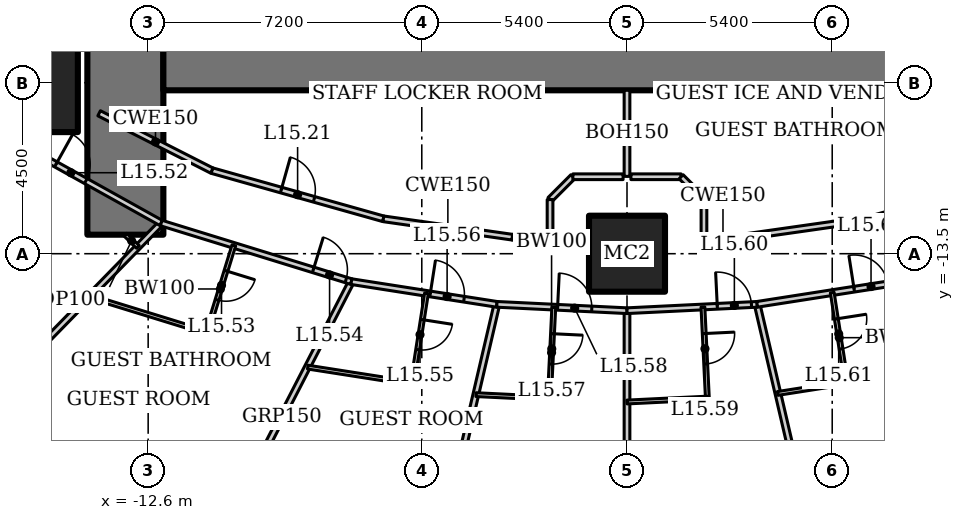
"""IFC4 building model, lengths in metres.
Left out: names, types, materials, properties, quantities, classifications, styles, units other than length and angle.
Written with IfcOpenShell. Run it as: python <this file> out.ifc"""

import sys

from ifc_helpers import new_model, si_unit, direction, frame, frame_2d, origin, origin_2d, place, context, subcontext, project, spatial, rectangle, hollow_rectangle, extrude, element, fill, save


model = new_model("IFC4")
c1 = context("Model", 3, precision=1e-05, world=origin(), true_north=direction((0.0, 1.0)))
c2 = subcontext(c1, "Body", "Model", "MODEL_VIEW")
j1 = project(units=[si_unit("LENGTHUNIT", "METRE"), si_unit("PLANEANGLEUNIT", "RADIAN")], contexts=[c1])
p1 = place(None, origin())
s1 = spatial("IfcSite", under=j1, at=p1, CompositionType="ELEMENT")
p2 = place(p1, origin())
s2 = spatial("IfcBuilding", under=s1, at=p2, CompositionType="ELEMENT")
p3 = place(p2, frame((0.0, 0.0, 69.4)))
s3 = spatial("IfcBuildingStorey", under=s2, at=p3, CompositionType="ELEMENT", Elevation=69.4)
p4 = place(p3, frame((-15.75, -9.0, 0.0), z_axis=(0.0, 0.0, 1.0), x_axis=(1.0, 0.0, 0.0)))
e1 = element("IfcColumn", 1, at=p4, inside=s3, PredefinedType="COLUMN", context=c2, shape_type="SweptSolid", body=[
    extrude(hollow_rectangle(XDim=2.6, YDim=2.6, WallThickness=0.13, at=origin_2d()), origin(), (0.0, 0.0, 1.0), 3.6),
])
p5 = place(p3, frame((0.0, -13.5, 0.0), z_axis=(0.0, 0.0, 1.0), x_axis=(1.0, 0.0, 0.0)))
e2 = element("IfcColumn", 2, at=p5, inside=s3, PredefinedType="COLUMN", context=c2, shape_type="SweptSolid", body=[
    extrude(hollow_rectangle(XDim=2.0, YDim=2.0, WallThickness=0.17, at=origin_2d()), origin(), (0.0, 0.0, 1.0), 3.6),
])
p6 = place(p3, frame((-13.2, 13.0, 0.0), z_axis=(0.0, 0.0, 1.0), x_axis=(0.0, -1.0, 0.0)))
e3 = element("IfcWall", 3, at=p6, inside=s3, PredefinedType="SHEAR", context=c2, shape_type="SweptSolid", body=[
    extrude(rectangle(XDim=26.0, YDim=2.0, at=frame_2d((13.0, 0.0))), origin(), (0.0, 0.0, 1.0), 3.6),
])
p7 = place(p6, frame((12.1, 0.0, 0.0)))
e4 = element("IfcOpeningElement", 4, at=p7, cuts=e3, PredefinedType="OPENING", context=c2, shape_type="SweptSolid", body=[
    extrude(rectangle(XDim=1.8, YDim=2.1, at=frame_2d((0.9, 1.05))), frame((0.0, 1.01, 0.0), z_axis=(0.0, -1.0, 0.0), x_axis=(1.0, 0.0, 0.0)), (0.0, 0.0, 1.0), 2.02),
])
p8 = place(p3, frame((-12.2, -8.0, 0.0), z_axis=(0.0, 0.0, 1.0), x_axis=(1.0, 0.0, 0.0)))
e5 = element("IfcWall", 5, at=p8, inside=s3, PredefinedType="SHEAR", context=c2, shape_type="SweptSolid", body=[
    extrude(rectangle(XDim=24.4, YDim=2.4, at=frame_2d((12.2, 0.0))), origin(), (0.0, 0.0, 1.0), 3.6),
])
p9 = place(p3, frame((-17.97, -18.542, 0.0), z_axis=(0.0, 0.0, 1.0), x_axis=(0.698757291878, 0.715358823981, 0.0)))
e6 = element("IfcWall", 6, at=p9, inside=s3, PredefinedType="PARTITIONING", context=c2, shape_type="SweptSolid", body=[
    extrude(rectangle(XDim=8.177, YDim=0.15, at=frame_2d((4.088, 0.0))), origin(), (0.0, 0.0, 1.0), 2.528),
])
p10 = place(p3, frame((-10.912, -21.346, 0.0), z_axis=(0.0, 0.0, 1.0), x_axis=(0.45752665959, 0.889195904042, 0.0)))
e7 = element("IfcWall", 7, at=p10, inside=s3, PredefinedType="PARTITIONING", context=c2, shape_type="SweptSolid", body=[
    extrude(rectangle(XDim=7.997, YDim=0.15, at=frame_2d((3.999, 0.0))), origin(), (0.0, 0.0, 1.0), 2.528),
])
p11 = place(p3, frame((-5.211, -22.496, 0.0), z_axis=(0.0, 0.0, 1.0), x_axis=(0.227056984461, 0.973881474209, 0.0)))
e8 = element("IfcWall", 8, at=p11, inside=s3, PredefinedType="PARTITIONING", context=c2, shape_type="SweptSolid", body=[
    extrude(rectangle(XDim=7.869, YDim=0.15, at=frame_2d((3.934, 0.0))), origin(), (0.0, 0.0, 1.0), 2.767),
])
p12 = place(p3, frame((0.0, -22.825, 0.0), z_axis=(0.0, 0.0, 1.0), x_axis=(0.0, 1.0, 0.0)))
e9 = element("IfcWall", 9, at=p12, inside=s3, PredefinedType="PARTITIONING", context=c2, shape_type="SweptSolid", body=[
    extrude(rectangle(XDim=7.825, YDim=0.15, at=frame_2d((3.912, 0.0))), origin(), (0.0, 0.0, 1.0), 2.924),
])
p13 = place(p3, frame((5.211, -22.496, 0.0), z_axis=(0.0, 0.0, 1.0), x_axis=(-0.227056984461, 0.973881474209, 0.0)))
e10 = element("IfcWall", 10, at=p13, inside=s3, PredefinedType="PARTITIONING", context=c2, shape_type="SweptSolid", body=[
    extrude(rectangle(XDim=7.869, YDim=0.15, at=frame_2d((3.934, 0.0))), origin(), (0.0, 0.0, 1.0), 2.767),
])
p14 = place(p3, frame((-17.299, -9.885, 0.0), z_axis=(0.0, 0.0, 1.0), x_axis=(0.873695910579, -0.486472461541, 0.0)))
e11 = element("IfcWall", 11, at=p14, inside=s3, PredefinedType="PARTITIONING", context=c2, shape_type="SweptSolid", body=[
    extrude(rectangle(XDim=5.771, YDim=0.15, at=frame_2d((2.885, 0.0))), origin(), (0.0, 0.0, 1.0), 3.45),
])
p15 = place(p14, frame((2.6, 0.0, 0.0)))
e12 = element("IfcOpeningElement", 12, at=p15, cuts=e11, PredefinedType="OPENING", context=c2, shape_type="SweptSolid", body=[
    extrude(rectangle(XDim=0.9, YDim=2.1, at=frame_2d((0.45, 1.05))), frame((0.0, 0.085, 0.0), z_axis=(0.0, -1.0, 0.0), x_axis=(1.0, 0.0, 0.0)), (0.0, 0.0, 1.0), 0.17),
])
p16 = place(p3, frame((-12.257, -12.693, 0.0), z_axis=(0.0, 0.0, 1.0), x_axis=(0.955657956744, -0.294478980085, 0.0)))
e13 = element("IfcWall", 13, at=p16, inside=s3, PredefinedType="PARTITIONING", context=c2, shape_type="SweptSolid", body=[
    extrude(rectangle(XDim=5.236, YDim=0.15, at=frame_2d((2.618, 0.0))), origin(), (0.0, 0.0, 1.0), 3.45),
])
p17 = place(p16, frame((4.186, 0.0, 0.0)))
e14 = element("IfcOpeningElement", 14, at=p17, cuts=e13, PredefinedType="OPENING", context=c2, shape_type="SweptSolid", body=[
    extrude(rectangle(XDim=0.9, YDim=2.1, at=frame_2d((0.45, 1.05))), frame((0.0, 0.085, 0.0), z_axis=(0.0, -1.0, 0.0), x_axis=(1.0, 0.0, 0.0)), (0.0, 0.0, 1.0), 0.17),
])
p18 = place(p3, frame((-7.253, -14.235, 0.0), z_axis=(0.0, 0.0, 1.0), x_axis=(0.988015036573, -0.154357660987, 0.0)))
e15 = element("IfcWall", 15, at=p18, inside=s3, PredefinedType="PARTITIONING", context=c2, shape_type="SweptSolid", body=[
    extrude(rectangle(XDim=3.875, YDim=0.15, at=frame_2d((1.938, 0.0))), origin(), (0.0, 0.0, 1.0), 3.45),
])
p19 = place(p18, frame((2.1, 0.0, 0.0)))
e16 = element("IfcOpeningElement", 16, at=p19, cuts=e15, PredefinedType="OPENING", context=c2, shape_type="SweptSolid", body=[
    extrude(rectangle(XDim=0.9, YDim=2.1, at=frame_2d((0.45, 1.05))), frame((0.0, 0.085, 0.0), z_axis=(0.0, -1.0, 0.0), x_axis=(1.0, 0.0, 0.0)), (0.0, 0.0, 1.0), 0.17),
])
p20 = place(p3, frame((-3.424, -14.833, 0.0), z_axis=(0.0, 0.0, 1.0), x_axis=(0.998809560203, -0.048779733975, 0.0)))
e17 = element("IfcWall", 17, at=p20, inside=s3, PredefinedType="PARTITIONING", context=c2, shape_type="SweptSolid", body=[
    extrude(rectangle(XDim=3.428, YDim=0.15, at=frame_2d((1.714, 0.0))), origin(), (0.0, 0.0, 1.0), 3.45),
])
p21 = place(p20, frame((1.6, 0.0, 0.0)))
e18 = element("IfcOpeningElement", 18, at=p21, cuts=e17, PredefinedType="OPENING", context=c2, shape_type="SweptSolid", body=[
    extrude(rectangle(XDim=0.9, YDim=2.1, at=frame_2d((0.45, 1.05))), frame((0.0, 0.085, 0.0), z_axis=(0.0, -1.0, 0.0), x_axis=(1.0, 0.0, 0.0)), (0.0, 0.0, 1.0), 0.17),
])
p22 = place(p3, frame((0.0, -15.0, 0.0), z_axis=(0.0, 0.0, 1.0), x_axis=(0.998809560203, 0.048779733975, 0.0)))
e19 = element("IfcWall", 19, at=p22, inside=s3, PredefinedType="PARTITIONING", context=c2, shape_type="SweptSolid", body=[
    extrude(rectangle(XDim=3.428, YDim=0.15, at=frame_2d((1.714, 0.0))), origin(), (0.0, 0.0, 1.0), 3.45),
])
p23 = place(p22, frame((2.378, 0.0, 0.0)))
e20 = element("IfcOpeningElement", 20, at=p23, cuts=e19, PredefinedType="OPENING", context=c2, shape_type="SweptSolid", body=[
    extrude(rectangle(XDim=0.9, YDim=2.1, at=frame_2d((0.45, 1.05))), frame((0.0, 0.085, 0.0), z_axis=(0.0, -1.0, 0.0), x_axis=(1.0, 0.0, 0.0)), (0.0, 0.0, 1.0), 0.17),
])
p24 = place(p3, frame((3.424, -14.833, 0.0), z_axis=(0.0, 0.0, 1.0), x_axis=(0.988015036573, 0.154357660987, 0.0)))
e21 = element("IfcWall", 21, at=p24, inside=s3, PredefinedType="PARTITIONING", context=c2, shape_type="SweptSolid", body=[
    extrude(rectangle(XDim=3.875, YDim=0.15, at=frame_2d((1.938, 0.0))), origin(), (0.0, 0.0, 1.0), 3.45),
])
p25 = place(p24, frame((2.583, 0.0, 0.0)))
e22 = element("IfcOpeningElement", 22, at=p25, cuts=e21, PredefinedType="OPENING", context=c2, shape_type="SweptSolid", body=[
    extrude(rectangle(XDim=0.9, YDim=2.1, at=frame_2d((0.45, 1.05))), frame((0.0, 0.085, 0.0), z_axis=(0.0, -1.0, 0.0), x_axis=(1.0, 0.0, 0.0)), (0.0, 0.0, 1.0), 0.17),
])
p26 = place(p3, frame((-10.924, -11.312, 0.0), z_axis=(0.0, 0.0, 1.0), x_axis=(0.962643729928, -0.270771211967, 0.0)))
e23 = element("IfcWall", 23, at=p26, inside=s3, PredefinedType="PARTITIONING", context=c2, shape_type="SweptSolid", body=[
    extrude(rectangle(XDim=4.688, YDim=0.15, at=frame_2d((2.344, 0.0))), origin(), (0.0, 0.0, 1.0), 3.45),
])
p27 = place(p26, frame((1.894, 0.0, 0.0)))
e24 = element("IfcOpeningElement", 24, at=p27, cuts=e23, PredefinedType="OPENING", context=c2, shape_type="SweptSolid", body=[
    extrude(rectangle(XDim=0.9, YDim=2.1, at=frame_2d((0.45, 1.05))), frame((0.0, 0.085, 0.0), z_axis=(0.0, -1.0, 0.0), x_axis=(1.0, 0.0, 0.0)), (0.0, 0.0, 1.0), 0.17),
])
for number, where, z_axis, x_axis in (
    (25, (-6.411, -12.582, 0.0), (0.0, 0.0, 1.0), (0.99, -0.141, 0.0)),
    (26, (3.016, -13.066, 0.0), (0.0, 0.0, 1.0), (0.99, 0.141, 0.0)),
):
    element("IfcWall", number, at=place(p3, frame(where, z_axis=z_axis, x_axis=x_axis)), inside=s3, PredefinedType="PARTITIONING", context=c2, shape_type="SweptSolid", body=[
        extrude(rectangle(XDim=3.429, YDim=0.15, at=frame_2d((1.714, 0.0))), origin(), (0.0, 0.0, 1.0), 3.45),
    ])
p28 = place(p3, frame((6.411, -12.582, 0.0), z_axis=(0.0, 0.0, 1.0), x_axis=(0.962643729928, 0.270771211967, 0.0)))
e27 = element("IfcWall", 27, at=p28, inside=s3, PredefinedType="PARTITIONING", context=c2, shape_type="SweptSolid", body=[
    extrude(rectangle(XDim=4.688, YDim=0.15, at=frame_2d((2.344, 0.0))), origin(), (0.0, 0.0, 1.0), 3.45),
])
p29 = place(p28, frame((1.894, 0.0, 0.0)))
e28 = element("IfcOpeningElement", 28, at=p29, cuts=e27, PredefinedType="OPENING", context=c2, shape_type="SweptSolid", body=[
    extrude(rectangle(XDim=0.9, YDim=2.1, at=frame_2d((0.45, 1.05))), frame((0.0, 0.085, 0.0), z_axis=(0.0, -1.0, 0.0), x_axis=(1.0, 0.0, 0.0)), (0.0, 0.0, 1.0), 0.17),
])
p30 = place(p3, frame((-10.346, -13.281, 0.0), z_axis=(0.0, 0.0, 1.0), x_axis=(-0.294478957423, -0.955657963727, 0.0)))
e29 = element("IfcWall", 29, at=p30, inside=s3, PredefinedType="PARTITIONING", context=c2, shape_type="SweptSolid", body=[
    extrude(rectangle(XDim=2.4, YDim=0.1, at=frame_2d((1.2, 0.0))), origin(), (0.0, 0.0, 1.0), 3.45),
])
p31 = place(p30, frame((0.7, 0.0, 0.0)))
e30 = element("IfcOpeningElement", 30, at=p31, cuts=e29, PredefinedType="OPENING", context=c2, shape_type="SweptSolid", body=[
    extrude(rectangle(XDim=0.8, YDim=2.1, at=frame_2d((0.4, 1.05))), frame((0.0, 0.06, 0.0), z_axis=(0.0, -1.0, 0.0), x_axis=(1.0, 0.0, 0.0)), (0.0, 0.0, 1.0), 0.12),
])
p32 = place(p3, frame((-11.052, -15.575, 0.0), z_axis=(0.0, 0.0, 1.0), x_axis=(-0.955641033268, 0.294533895391, 0.0)))
e31 = element("IfcWall", 31, at=p32, inside=s3, PredefinedType="PARTITIONING", context=c2, shape_type="SweptSolid", body=[
    extrude(rectangle(XDim=3.216, YDim=0.1, at=frame_2d((1.608, 0.0))), origin(), (0.0, 0.0, 1.0), 3.45),
])
p33 = place(p3, frame((-5.277, -14.543, 0.0), z_axis=(0.0, 0.0, 1.0), x_axis=(-0.154426532979, -0.988004274238, 0.0)))
e32 = element("IfcWall", 32, at=p33, inside=s3, PredefinedType="PARTITIONING", context=c2, shape_type="SweptSolid", body=[
    extrude(rectangle(XDim=2.4, YDim=0.1, at=frame_2d((1.2, 0.0))), origin(), (0.0, 0.0, 1.0), 3.45),
])
p34 = place(p33, frame((0.7, 0.0, 0.0)))
e33 = element("IfcOpeningElement", 33, at=p34, cuts=e32, PredefinedType="OPENING", context=c2, shape_type="SweptSolid", body=[
    extrude(rectangle(XDim=0.8, YDim=2.1, at=frame_2d((0.4, 1.05))), frame((0.0, 0.06, 0.0), z_axis=(0.0, -1.0, 0.0), x_axis=(1.0, 0.0, 0.0)), (0.0, 0.0, 1.0), 0.12),
])
p35 = place(p3, frame((-5.647, -16.915, 0.0), z_axis=(0.0, 0.0, 1.0), x_axis=(-0.988015375833, 0.154355489429, 0.0)))
e34 = element("IfcWall", 34, at=p35, inside=s3, PredefinedType="PARTITIONING", context=c2, shape_type="SweptSolid", body=[
    extrude(rectangle(XDim=2.785, YDim=0.1, at=frame_2d((1.393, 0.0))), origin(), (0.0, 0.0, 1.0), 3.45),
])
p36 = place(p3, frame((-1.926, -14.906, 0.0), z_axis=(0.0, 0.0, 1.0), x_axis=(-0.048725028858, -0.998812230383, 0.0)))
e35 = element("IfcWall", 35, at=p36, inside=s3, PredefinedType="PARTITIONING", context=c2, shape_type="SweptSolid", body=[
    extrude(rectangle(XDim=2.4, YDim=0.1, at=frame_2d((1.2, 0.0))), origin(), (0.0, 0.0, 1.0), 2.749),
])
p37 = place(p36, frame((0.7, 0.0, 0.0)))
e36 = element("IfcOpeningElement", 36, at=p37, cuts=e35, PredefinedType="OPENING", context=c2, shape_type="SweptSolid", body=[
    extrude(rectangle(XDim=0.8, YDim=2.1, at=frame_2d((0.4, 1.05))), frame((0.0, 0.06, 0.0), z_axis=(0.0, -1.0, 0.0), x_axis=(1.0, 0.0, 0.0)), (0.0, 0.0, 1.0), 0.12),
])
p38 = place(p3, frame((-2.043, -17.303, 0.0), z_axis=(0.0, 0.0, 1.0), x_axis=(-0.998809649749, 0.048777900405, 0.0)))
e37 = element("IfcWall", 37, at=p38, inside=s3, PredefinedType="PARTITIONING", context=c2, shape_type="SweptSolid", body=[
    extrude(rectangle(XDim=1.932, YDim=0.1, at=frame_2d((0.966, 0.0))), origin(), (0.0, 0.0, 1.0), 3.45),
])
p39 = place(p3, frame((1.998, -14.903, 0.0), z_axis=(0.0, 0.0, 1.0), x_axis=(0.048831470304, -0.998807032168, 0.0)))
e38 = element("IfcWall", 38, at=p39, inside=s3, PredefinedType="PARTITIONING", context=c2, shape_type="SweptSolid", body=[
    extrude(rectangle(XDim=2.4, YDim=0.1, at=frame_2d((1.2, 0.0))), origin(), (0.0, 0.0, 1.0), 2.749),
])
p40 = place(p39, frame((0.7, 0.0, 0.0)))
e39 = element("IfcOpeningElement", 39, at=p40, cuts=e38, PredefinedType="OPENING", context=c2, shape_type="SweptSolid", body=[
    extrude(rectangle(XDim=0.8, YDim=2.1, at=frame_2d((0.4, 1.05))), frame((0.0, 0.06, 0.0), z_axis=(0.0, -1.0, 0.0), x_axis=(1.0, 0.0, 0.0)), (0.0, 0.0, 1.0), 0.12),
])
p41 = place(p3, frame((2.115, -17.3, 0.0), z_axis=(0.0, 0.0, 1.0), x_axis=(-0.998809749254, -0.048775862842, 0.0)))
e40 = element("IfcWall", 40, at=p41, inside=s3, PredefinedType="PARTITIONING", context=c2, shape_type="SweptSolid", body=[
    extrude(rectangle(XDim=2.117, YDim=0.1, at=frame_2d((1.059, 0.0))), origin(), (0.0, 0.0, 1.0), 3.45),
])
p42 = place(p3, frame((5.4, -14.524, 0.0), z_axis=(0.0, 0.0, 1.0), x_axis=(0.154426532979, -0.988004274238, 0.0)))
e41 = element("IfcWall", 41, at=p42, inside=s3, PredefinedType="PARTITIONING", context=c2, shape_type="SweptSolid", body=[
    extrude(rectangle(XDim=2.4, YDim=0.1, at=frame_2d((1.2, 0.0))), origin(), (0.0, 0.0, 1.0), 3.45),
])
p43 = place(p42, frame((0.7, 0.0, 0.0)))
e42 = element("IfcOpeningElement", 42, at=p43, cuts=e41, PredefinedType="OPENING", context=c2, shape_type="SweptSolid", body=[
    extrude(rectangle(XDim=0.8, YDim=2.1, at=frame_2d((0.4, 1.05))), frame((0.0, 0.06, 0.0), z_axis=(0.0, -1.0, 0.0), x_axis=(1.0, 0.0, 0.0)), (0.0, 0.0, 1.0), 0.12),
])
p44 = place(p3, frame((5.771, -16.895, 0.0), z_axis=(0.0, 0.0, 1.0), x_axis=(-0.98801840204, -0.154336117711, 0.0)))
e43 = element("IfcWall", 43, at=p44, inside=s3, PredefinedType="PARTITIONING", context=c2, shape_type="SweptSolid", body=[
    extrude(rectangle(XDim=1.827, YDim=0.1, at=frame_2d((0.914, 0.0))), origin(), (0.0, 0.0, 1.0), 3.45),
])
p45 = place(p3, frame((-13.2, -13.0, 0.0), z_axis=(0.0, 0.0, 1.0), x_axis=(0.715289751842, -0.698827998087, 0.0)))
e44 = element("IfcWall", 44, at=p45, inside=s3, PredefinedType="PARTITIONING", context=c2, shape_type="SweptSolid", body=[
    extrude(rectangle(XDim=0.46, YDim=0.1, at=frame_2d((0.23, 0.0))), origin(), (0.0, 0.0, 1.0), 3.45),
])
p46 = place(p3, frame((-13.89, -9.805, 0.0), z_axis=(0.0, 0.0, 1.0), x_axis=(0.891398195277, -0.453220980821, 0.0)))
e45 = element("IfcWall", 45, at=p46, inside=s3, PredefinedType="PARTITIONING", context=c2, shape_type="SweptSolid", body=[
    extrude(rectangle(XDim=3.327, YDim=0.15, at=frame_2d((1.664, 0.0))), origin(), (0.0, 0.0, 1.0), 3.45),
])
for number, where, z_axis, x_axis in (
    (46, (-3.016, -13.066, 0.0), (0.0, 0.0, 1.0), (0.999, -0.044, 0.0)),
    (47, (2.035, -13.109, 0.0), (0.0, 0.0, 1.0), (0.999, 0.044, 0.0)),
):
    element("IfcWall", number, at=place(p3, frame(where, z_axis=z_axis, x_axis=x_axis)), inside=s3, PredefinedType="PARTITIONING", context=c2, shape_type="SweptSolid", body=[
        extrude(rectangle(XDim=0.982, YDim=0.15, at=frame_2d((0.491, 0.0))), origin(), (0.0, 0.0, 1.0), 3.45),
    ])
p47 = place(p3, frame((0.0, -9.2, 0.0), z_axis=(0.0, 0.0, 1.0), x_axis=(0.0, -1.0, 0.0)))
e48 = element("IfcWall", 48, at=p47, inside=s3, PredefinedType="PARTITIONING", context=c2, shape_type="SweptSolid", body=[
    extrude(rectangle(XDim=2.265, YDim=0.15, at=frame_2d((1.133, 0.0))), origin(), (0.0, 0.0, 1.0), 3.044),
])
p48 = place(p3, frame((-2.025, -12.075, 0.0), z_axis=(0.0, 0.0, 1.0), x_axis=(0.707106781187, 0.707106781187, 0.0)))
e49 = element("IfcWall", 49, at=p48, inside=s3, PredefinedType="PARTITIONING", context=c2, shape_type="SweptSolid", body=[
    extrude(rectangle(XDim=0.849, YDim=0.15, at=frame_2d((0.425, 0.0))), origin(), (0.0, 0.0, 1.0), 3.45),
])
p49 = place(p3, frame((-1.425, -11.475, 0.0), z_axis=(0.0, 0.0, 1.0), x_axis=(1.0, 0.0, 0.0)))
e50 = element("IfcWall", 50, at=p49, inside=s3, PredefinedType="PARTITIONING", context=c2, shape_type="SweptSolid", body=[
    extrude(rectangle(XDim=1.321, YDim=0.15, at=frame_2d((0.661, 0.0))), origin(), (0.0, 0.0, 1.0), 3.45),
])
p50 = place(p3, frame((-2.025, -13.005, 0.0), z_axis=(0.0, 0.0, 1.0), x_axis=(0.0, 1.0, 0.0)))
e51 = element("IfcWall", 51, at=p50, inside=s3, PredefinedType="PARTITIONING", context=c2, shape_type="SweptSolid", body=[
    extrude(rectangle(XDim=0.93, YDim=0.15, at=frame_2d((0.465, 0.0))), origin(), (0.0, 0.0, 1.0), 2.749),
])
p51 = place(p3, frame((0.103, -11.475, 0.0), z_axis=(0.0, 0.0, 1.0), x_axis=(1.0, 0.0, 0.0)))
e52 = element("IfcWall", 52, at=p51, inside=s3, PredefinedType="PARTITIONING", context=c2, shape_type="SweptSolid", body=[
    extrude(rectangle(XDim=1.321, YDim=0.15, at=frame_2d((0.661, 0.0))), origin(), (0.0, 0.0, 1.0), 3.45),
])
p52 = place(p3, frame((1.425, -11.475, 0.0), z_axis=(0.0, 0.0, 1.0), x_axis=(0.707106781187, -0.707106781187, 0.0)))
e53 = element("IfcWall", 53, at=p52, inside=s3, PredefinedType="PARTITIONING", context=c2, shape_type="SweptSolid", body=[
    extrude(rectangle(XDim=0.849, YDim=0.15, at=frame_2d((0.425, 0.0))), origin(), (0.0, 0.0, 1.0), 3.45),
])
p53 = place(p3, frame((2.025, -12.075, 0.0), z_axis=(0.0, 0.0, 1.0), x_axis=(0.0, -1.0, 0.0)))
e54 = element("IfcWall", 54, at=p53, inside=s3, PredefinedType="PARTITIONING", context=c2, shape_type="SweptSolid", body=[
    extrude(rectangle(XDim=0.93, YDim=0.15, at=frame_2d((0.465, 0.0))), origin(), (0.0, 0.0, 1.0), 2.749),
])
p54 = place(p27, origin())
e55 = element("IfcDoor", 55, at=p54, inside=s3, OperationType="SINGLE_SWING_LEFT", PredefinedType="DOOR", context=c2, shape_type="SweptSolid", body=[
    extrude(rectangle(XDim=0.9, YDim=2.1, at=frame_2d((0.45, 1.05))), frame((0.0, 0.025, 0.0), z_axis=(0.0, -1.0, 0.0), x_axis=(1.0, 0.0, 0.0)), (0.0, 0.0, 1.0), 0.05),
])
fill(e24, e55)
p55 = place(p15, origin())
e56 = element("IfcDoor", 56, at=p55, inside=s3, OperationType="SINGLE_SWING_LEFT", PredefinedType="DOOR", context=c2, shape_type="SweptSolid", body=[
    extrude(rectangle(XDim=0.9, YDim=2.1, at=frame_2d((0.45, 1.05))), frame((0.0, 0.025, 0.0), z_axis=(0.0, -1.0, 0.0), x_axis=(1.0, 0.0, 0.0)), (0.0, 0.0, 1.0), 0.05),
])
fill(e12, e56)
p56 = place(p31, origin())
e57 = element("IfcDoor", 57, at=p56, inside=s3, OperationType="SINGLE_SWING_LEFT", PredefinedType="DOOR", context=c2, shape_type="SweptSolid", body=[
    extrude(rectangle(XDim=0.8, YDim=2.1, at=frame_2d((0.4, 1.05))), frame((0.0, 0.025, 0.0), z_axis=(0.0, -1.0, 0.0), x_axis=(1.0, 0.0, 0.0)), (0.0, 0.0, 1.0), 0.05),
])
fill(e30, e57)
p57 = place(p17, origin())
e58 = element("IfcDoor", 58, at=p57, inside=s3, OperationType="SINGLE_SWING_LEFT", PredefinedType="DOOR", context=c2, shape_type="SweptSolid", body=[
    extrude(rectangle(XDim=0.9, YDim=2.1, at=frame_2d((0.45, 1.05))), frame((0.0, 0.025, 0.0), z_axis=(0.0, -1.0, 0.0), x_axis=(1.0, 0.0, 0.0)), (0.0, 0.0, 1.0), 0.05),
])
fill(e14, e58)
p58 = place(p34, origin())
e59 = element("IfcDoor", 59, at=p58, inside=s3, OperationType="SINGLE_SWING_LEFT", PredefinedType="DOOR", context=c2, shape_type="SweptSolid", body=[
    extrude(rectangle(XDim=0.8, YDim=2.1, at=frame_2d((0.4, 1.05))), frame((0.0, 0.025, 0.0), z_axis=(0.0, -1.0, 0.0), x_axis=(1.0, 0.0, 0.0)), (0.0, 0.0, 1.0), 0.05),
])
fill(e33, e59)
p59 = place(p19, origin())
e60 = element("IfcDoor", 60, at=p59, inside=s3, OperationType="SINGLE_SWING_LEFT", PredefinedType="DOOR", context=c2, shape_type="SweptSolid", body=[
    extrude(rectangle(XDim=0.9, YDim=2.1, at=frame_2d((0.45, 1.05))), frame((0.0, 0.025, 0.0), z_axis=(0.0, -1.0, 0.0), x_axis=(1.0, 0.0, 0.0)), (0.0, 0.0, 1.0), 0.05),
])
fill(e16, e60)
p60 = place(p37, origin())
e61 = element("IfcDoor", 61, at=p60, inside=s3, OperationType="SINGLE_SWING_LEFT", PredefinedType="DOOR", context=c2, shape_type="SweptSolid", body=[
    extrude(rectangle(XDim=0.8, YDim=2.1, at=frame_2d((0.4, 1.05))), frame((0.0, 0.025, 0.0), z_axis=(0.0, -1.0, 0.0), x_axis=(1.0, 0.0, 0.0)), (0.0, 0.0, 1.0), 0.05),
])
fill(e36, e61)
p61 = place(p21, origin())
e62 = element("IfcDoor", 62, at=p61, inside=s3, OperationType="SINGLE_SWING_LEFT", PredefinedType="DOOR", context=c2, shape_type="SweptSolid", body=[
    extrude(rectangle(XDim=0.9, YDim=2.1, at=frame_2d((0.45, 1.05))), frame((0.0, 0.025, 0.0), z_axis=(0.0, -1.0, 0.0), x_axis=(1.0, 0.0, 0.0)), (0.0, 0.0, 1.0), 0.05),
])
fill(e18, e62)
p62 = place(p40, origin())
e63 = element("IfcDoor", 63, at=p62, inside=s3, OperationType="SINGLE_SWING_LEFT", PredefinedType="DOOR", context=c2, shape_type="SweptSolid", body=[
    extrude(rectangle(XDim=0.8, YDim=2.1, at=frame_2d((0.4, 1.05))), frame((0.0, 0.025, 0.0), z_axis=(0.0, -1.0, 0.0), x_axis=(1.0, 0.0, 0.0)), (0.0, 0.0, 1.0), 0.05),
])
fill(e39, e63)
p63 = place(p23, origin())
e64 = element("IfcDoor", 64, at=p63, inside=s3, OperationType="SINGLE_SWING_LEFT", PredefinedType="DOOR", context=c2, shape_type="SweptSolid", body=[
    extrude(rectangle(XDim=0.9, YDim=2.1, at=frame_2d((0.45, 1.05))), frame((0.0, 0.025, 0.0), z_axis=(0.0, -1.0, 0.0), x_axis=(1.0, 0.0, 0.0)), (0.0, 0.0, 1.0), 0.05),
])
fill(e20, e64)
p64 = place(p43, origin())
e65 = element("IfcDoor", 65, at=p64, inside=s3, OperationType="SINGLE_SWING_LEFT", PredefinedType="DOOR", context=c2, shape_type="SweptSolid", body=[
    extrude(rectangle(XDim=0.8, YDim=2.1, at=frame_2d((0.4, 1.05))), frame((0.0, 0.025, 0.0), z_axis=(0.0, -1.0, 0.0), x_axis=(1.0, 0.0, 0.0)), (0.0, 0.0, 1.0), 0.05),
])
fill(e42, e65)
p65 = place(p25, origin())
e66 = element("IfcDoor", 66, at=p65, inside=s3, OperationType="SINGLE_SWING_LEFT", PredefinedType="DOOR", context=c2, shape_type="SweptSolid", body=[
    extrude(rectangle(XDim=0.9, YDim=2.1, at=frame_2d((0.45, 1.05))), frame((0.0, 0.025, 0.0), z_axis=(0.0, -1.0, 0.0), x_axis=(1.0, 0.0, 0.0)), (0.0, 0.0, 1.0), 0.05),
])
fill(e22, e66)
save(model, sys.argv[1])
